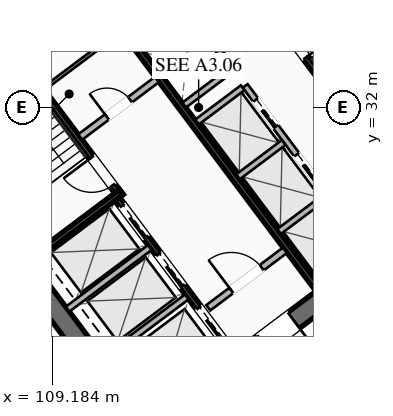
"""IFC4 building model, lengths in metres.
Left out: names, types, materials, properties, quantities, classifications, styles, units other than length and angle.
Written with IfcOpenShell. Run it as: python <this file> out.ifc"""

import sys

from ifc_helpers import new_model, si_unit, direction, frame, frame_2d, origin, place, context, subcontext, project, spatial, rectangle, extrude, element, fill, save


model = new_model("IFC4")
c1 = context("Model", 3, precision=1e-05, world=origin(), true_north=direction((0.0, 1.0)))
c2 = subcontext(c1, "Body", "Model", "MODEL_VIEW")
j1 = project(units=[si_unit("LENGTHUNIT", "METRE"), si_unit("PLANEANGLEUNIT", "RADIAN")], contexts=[c1])
p1 = place(None, origin())
s1 = spatial("IfcSite", under=j1, at=p1, CompositionType="ELEMENT")
p2 = place(p1, origin())
s2 = spatial("IfcBuilding", under=s1, at=p2, CompositionType="ELEMENT")
p3 = place(p2, frame((0.0, 0.0, 28.15)))
s3 = spatial("IfcBuildingStorey", under=s2, at=p3, CompositionType="ELEMENT", Elevation=28.15)
for number, where, z_axis, x_axis in (
    (1, (112.476, 21.107, 0.0), (0.0, 0.0, 1.0), (-0.6, 0.8, 0.0)),
    (2, (115.524, 42.893, 0.0), (0.0, 0.0, 1.0), (0.6, -0.8, 0.0)),
):
    element("IfcWall", number, at=place(p3, frame(where, z_axis=z_axis, x_axis=x_axis)), inside=s3, PredefinedType="SHEAR", context=c2, shape_type="SweptSolid", body=[
        extrude(rectangle(XDim=15.6, YDim=0.65, at=frame_2d((7.8, 0.0))), origin(), (0.0, 0.0, 1.0), 3.55),
    ])
p4 = place(p3, frame((124.429, 30.478, 0.0), z_axis=(0.0, 0.0, 1.0), x_axis=(-0.799998028465, -0.600002628705, 0.0)))
e3 = element("IfcWall", 3, at=p4, inside=s3, PredefinedType="SHEAR", context=c2, shape_type="SweptSolid", body=[
    extrude(rectangle(XDim=14.86, YDim=0.65, at=frame_2d((7.43, 0.0))), origin(), (0.0, 0.0, 1.0), 3.55),
])
p5 = place(p4, frame((9.13, 0.0, 0.0)))
e4 = element("IfcOpeningElement", 4, at=p5, cuts=e3, PredefinedType="OPENING", context=c2, shape_type="SweptSolid", body=[
    extrude(rectangle(XDim=1.25, YDim=2.25, at=frame_2d((0.625, 1.125))), frame((0.0, 0.335, 0.0), z_axis=(0.0, -1.0, 0.0), x_axis=(1.0, 0.0, 0.0)), (0.0, 0.0, 1.0), 0.67),
])
p6 = place(p4, frame((4.08, 0.0, 0.0)))
e5 = element("IfcOpeningElement", 5, at=p6, cuts=e3, PredefinedType="OPENING", context=c2, shape_type="SweptSolid", body=[
    extrude(rectangle(XDim=1.25, YDim=2.25, at=frame_2d((0.625, 1.125))), frame((0.0, 0.335, 0.0), z_axis=(0.0, -1.0, 0.0), x_axis=(1.0, 0.0, 0.0)), (0.0, 0.0, 1.0), 0.67),
])
p7 = place(p3, frame((103.571, 33.522, 0.0), z_axis=(0.0, 0.0, 1.0), x_axis=(0.799998028465, 0.600002628705, 0.0)))
e6 = element("IfcWall", 6, at=p7, inside=s3, PredefinedType="SHEAR", context=c2, shape_type="SweptSolid", body=[
    extrude(rectangle(XDim=14.86, YDim=0.65, at=frame_2d((7.43, 0.0))), origin(), (0.0, 0.0, 1.0), 3.55),
])
p8 = place(p7, frame((4.48, 0.0, 0.0)))
e7 = element("IfcOpeningElement", 7, at=p8, cuts=e6, PredefinedType="OPENING", context=c2, shape_type="SweptSolid", body=[
    extrude(rectangle(XDim=1.25, YDim=2.25, at=frame_2d((0.625, 1.125))), frame((0.0, 0.335, 0.0), z_axis=(0.0, -1.0, 0.0), x_axis=(1.0, 0.0, 0.0)), (0.0, 0.0, 1.0), 0.67),
])
p9 = place(p7, frame((9.53, 0.0, 0.0)))
e8 = element("IfcOpeningElement", 8, at=p9, cuts=e6, PredefinedType="OPENING", context=c2, shape_type="SweptSolid", body=[
    extrude(rectangle(XDim=1.25, YDim=2.25, at=frame_2d((0.625, 1.125))), frame((0.0, 0.335, 0.0), z_axis=(0.0, -1.0, 0.0), x_axis=(1.0, 0.0, 0.0)), (0.0, 0.0, 1.0), 0.67),
])
p10 = place(p3, frame((111.44, 29.08, 0.0), z_axis=(0.0, 0.0, 1.0), x_axis=(-0.600009827119, 0.799992629566, 0.0)))
e9 = element("IfcWall", 9, at=p10, inside=s3, PredefinedType="SHEAR", context=c2, shape_type="SweptSolid", body=[
    extrude(rectangle(XDim=7.95, YDim=0.2, at=frame_2d((3.975, 0.0))), origin(), (0.0, 0.0, 1.0), 3.35),
])
p11 = place(p10, frame((0.45, 0.0, 0.0)))
e10 = element("IfcOpeningElement", 10, at=p11, cuts=e9, PredefinedType="OPENING", context=c2, shape_type="SweptSolid", body=[
    extrude(rectangle(XDim=1.15, YDim=2.2, at=frame_2d((0.575, 1.1))), frame((0.0, 0.11, 0.0), z_axis=(0.0, -1.0, 0.0), x_axis=(1.0, 0.0, 0.0)), (0.0, 0.0, 1.0), 0.22),
])
p12 = place(p3, frame((108.476, 26.982, 0.0), z_axis=(0.0, 0.0, 1.0), x_axis=(0.799984290658, 0.600020945218, 0.0)))
e11 = element("IfcWall", 11, at=p12, inside=s3, PredefinedType="SHEAR", context=c2, shape_type="SweptSolid", body=[
    extrude(rectangle(XDim=3.73, YDim=0.2, at=frame_2d((1.865, 0.0))), origin(), (0.0, 0.0, 1.0), 3.35),
])
p13 = place(p3, frame((116.56, 34.92, 0.0), z_axis=(0.0, 0.0, 1.0), x_axis=(0.600009827119, -0.799992629566, 0.0)))
e12 = element("IfcWall", 12, at=p13, inside=s3, PredefinedType="SHEAR", context=c2, shape_type="SweptSolid", body=[
    extrude(rectangle(XDim=7.95, YDim=0.2, at=frame_2d((3.975, 0.0))), origin(), (0.0, 0.0, 1.0), 3.35),
])
p14 = place(p13, frame((0.45, 0.0, 0.0)))
e13 = element("IfcOpeningElement", 13, at=p14, cuts=e12, PredefinedType="OPENING", context=c2, shape_type="SweptSolid", body=[
    extrude(rectangle(XDim=1.15, YDim=2.2, at=frame_2d((0.575, 1.1))), frame((0.0, 0.11, 0.0), z_axis=(0.0, -1.0, 0.0), x_axis=(1.0, 0.0, 0.0)), (0.0, 0.0, 1.0), 0.22),
])
p15 = place(p3, frame((117.938, 26.016, 0.0), z_axis=(0.0, 0.0, 1.0), x_axis=(-0.600005463273, 0.799995902516, 0.0)))
e14 = element("IfcWall", 14, at=p15, inside=s3, PredefinedType="SHEAR", context=c2, shape_type="SweptSolid", body=[
    extrude(rectangle(XDim=14.3, YDim=0.2, at=frame_2d((7.15, 0.0))), origin(), (0.0, 0.0, 1.0), 3.35),
])
p16 = place(p3, frame((110.104, 31.028, 0.0), z_axis=(0.0, 0.0, 1.0), x_axis=(0.800018601094, 0.59997519774, 0.0)))
e15 = element("IfcWall", 15, at=p16, inside=s3, PredefinedType="SOLIDWALL", context=c2, shape_type="SweptSolid", body=[
    extrude(rectangle(XDim=3.15, YDim=0.22, at=frame_2d((1.575, 0.0))), origin(), (0.0, 0.0, 1.0), 2.703),
])
p17 = place(p16, frame((1.1, 0.0, 0.0)))
e16 = element("IfcOpeningElement", 16, at=p17, cuts=e15, PredefinedType="OPENING", context=c2, shape_type="SweptSolid", body=[
    extrude(rectangle(XDim=0.95, YDim=2.05, at=frame_2d((0.475, 1.025))), frame((0.0, 0.12, 0.0), z_axis=(0.0, -1.0, 0.0), x_axis=(1.0, 0.0, 0.0)), (0.0, 0.0, 1.0), 0.24),
])
p18 = place(p3, frame((114.316, 25.412, 0.0), z_axis=(0.0, 0.0, 1.0), x_axis=(0.800018601094, 0.59997519774, 0.0)))
e17 = element("IfcWall", 17, at=p18, inside=s3, PredefinedType="SOLIDWALL", context=c2, shape_type="SweptSolid", body=[
    extrude(rectangle(XDim=3.15, YDim=0.22, at=frame_2d((1.575, 0.0))), origin(), (0.0, 0.0, 1.0), 2.703),
])
p19 = place(p18, frame((0.95, 0.0, 0.0)))
e18 = element("IfcOpeningElement", 18, at=p19, cuts=e17, PredefinedType="OPENING", context=c2, shape_type="SweptSolid", body=[
    extrude(rectangle(XDim=1.25, YDim=2.25, at=frame_2d((0.625, 1.125))), frame((0.0, 0.12, 0.0), z_axis=(0.0, -1.0, 0.0), x_axis=(1.0, 0.0, 0.0)), (0.0, 0.0, 1.0), 0.24),
])
p20 = place(p3, frame((115.13, 23.91, 0.0), z_axis=(0.0, 0.0, 1.0), x_axis=(-0.599975393228, 0.800018454488, 0.0)))
e19 = element("IfcWall", 19, at=p20, inside=s3, PredefinedType="SHEAR", context=c2, shape_type="SweptSolid", body=[
    extrude(rectangle(XDim=6.35, YDim=0.2, at=frame_2d((3.175, 0.0))), origin(), (0.0, 0.0, 1.0), 3.35),
])
p21 = place(p20, frame((4.775, 0.0, 0.0)))
e20 = element("IfcOpeningElement", 20, at=p21, cuts=e19, PredefinedType="OPENING", context=c2, shape_type="SweptSolid", body=[
    extrude(rectangle(XDim=1.3, YDim=2.25, at=frame_2d((0.65, 1.125))), frame((0.0, 0.11, 0.0), z_axis=(0.0, -1.0, 0.0), x_axis=(1.0, 0.0, 0.0)), (0.0, 0.0, 1.0), 0.22),
])
p22 = place(p20, frame((2.775, 0.0, 0.0)))
e21 = element("IfcOpeningElement", 21, at=p22, cuts=e19, PredefinedType="OPENING", context=c2, shape_type="SweptSolid", body=[
    extrude(rectangle(XDim=1.3, YDim=2.25, at=frame_2d((0.65, 1.125))), frame((0.0, 0.11, 0.0), z_axis=(0.0, -1.0, 0.0), x_axis=(1.0, 0.0, 0.0)), (0.0, 0.0, 1.0), 0.22),
])
p23 = place(p20, frame((0.575, 0.0, 0.0)))
e22 = element("IfcOpeningElement", 22, at=p23, cuts=e19, PredefinedType="OPENING", context=c2, shape_type="SweptSolid", body=[
    extrude(rectangle(XDim=1.3, YDim=2.25, at=frame_2d((0.65, 1.125))), frame((0.0, 0.11, 0.0), z_axis=(0.0, -1.0, 0.0), x_axis=(1.0, 0.0, 0.0)), (0.0, 0.0, 1.0), 0.22),
])
for number, where, z_axis, x_axis in (
    (23, (110.906, 23.742, 0.0), (0.0, 0.0, 1.0), (0.8, 0.6, 0.0)),
    (24, (109.688, 25.366, 0.0), (0.0, 0.0, 1.0), (0.8, 0.6, 0.0)),
):
    element("IfcWall", number, at=place(p3, frame(where, z_axis=z_axis, x_axis=x_axis)), inside=s3, PredefinedType="SOLIDWALL", context=c2, shape_type="SweptSolid", body=[
        extrude(rectangle(XDim=3.38, YDim=0.2, at=frame_2d((1.69, 0.0))), origin(), (0.0, 0.0, 1.0), 3.35),
    ])
p24 = place(p3, frame((108.91, 32.62, 0.0), z_axis=(0.0, 0.0, 1.0), x_axis=(0.800018601094, 0.59997519774, 0.0)))
e25 = element("IfcWall", 25, at=p24, inside=s3, PredefinedType="PARTITIONING", context=c2, shape_type="SweptSolid", body=[
    extrude(rectangle(XDim=3.15, YDim=0.11, at=frame_2d((1.575, 0.0))), origin(), (0.0, 0.0, 1.0), 2.703),
])
p25 = place(p3, frame((119.61, 27.27, 0.0), z_axis=(0.0, 0.0, 1.0), x_axis=(-0.600011488909, 0.79999138319, 0.0)))
e26 = element("IfcWall", 26, at=p25, inside=s3, PredefinedType="SOLIDWALL", context=c2, shape_type="SweptSolid", body=[
    extrude(rectangle(XDim=6.8, YDim=0.2, at=frame_2d((3.4, 0.0))), origin(), (0.0, 0.0, 1.0), 3.35),
])
p26 = place(p25, frame((0.625, 0.0, 0.0)))
e27 = element("IfcOpeningElement", 27, at=p26, cuts=e26, PredefinedType="OPENING", context=c2, shape_type="SweptSolid", body=[
    extrude(rectangle(XDim=1.1, YDim=2.2, at=frame_2d((0.55, 1.1))), frame((0.0, 0.11, 0.0), z_axis=(0.0, -1.0, 0.0), x_axis=(1.0, 0.0, 0.0)), (0.0, 0.0, 1.0), 0.22),
])
p27 = place(p25, frame((2.875, 0.0, 0.0)))
e28 = element("IfcOpeningElement", 28, at=p27, cuts=e26, PredefinedType="OPENING", context=c2, shape_type="SweptSolid", body=[
    extrude(rectangle(XDim=1.1, YDim=2.2, at=frame_2d((0.55, 1.1))), frame((0.0, 0.11, 0.0), z_axis=(0.0, -1.0, 0.0), x_axis=(1.0, 0.0, 0.0)), (0.0, 0.0, 1.0), 0.22),
])
p28 = place(p25, frame((5.125, 0.0, 0.0)))
e29 = element("IfcOpeningElement", 29, at=p28, cuts=e26, PredefinedType="OPENING", context=c2, shape_type="SweptSolid", body=[
    extrude(rectangle(XDim=1.1, YDim=2.2, at=frame_2d((0.55, 1.1))), frame((0.0, 0.11, 0.0), z_axis=(0.0, -1.0, 0.0), x_axis=(1.0, 0.0, 0.0)), (0.0, 0.0, 1.0), 0.22),
])
p29 = place(p3, frame((116.646, 27.922, 0.0), z_axis=(0.0, 0.0, 1.0), x_axis=(0.8, 0.6, 0.0)))
e30 = element("IfcWall", 30, at=p29, inside=s3, PredefinedType="SOLIDWALL", context=c2, shape_type="SweptSolid", body=[
    extrude(rectangle(XDim=1.88, YDim=0.2, at=frame_2d((0.94, 0.0))), origin(), (0.0, 0.0, 1.0), 3.35),
])
p30 = place(p3, frame((115.296, 29.722, 0.0), z_axis=(0.0, 0.0, 1.0), x_axis=(0.799984418148, 0.600020775241, 0.0)))
e31 = element("IfcWall", 31, at=p30, inside=s3, PredefinedType="SOLIDWALL", context=c2, shape_type="SweptSolid", body=[
    extrude(rectangle(XDim=1.88, YDim=0.2, at=frame_2d((0.94, 0.0))), origin(), (0.0, 0.0, 1.0), 3.35),
])
p31 = place(p3, frame((113.946, 31.522, 0.0), z_axis=(0.0, 0.0, 1.0), x_axis=(0.8, 0.6, 0.0)))
e32 = element("IfcWall", 32, at=p31, inside=s3, PredefinedType="SOLIDWALL", context=c2, shape_type="SweptSolid", body=[
    extrude(rectangle(XDim=1.88, YDim=0.2, at=frame_2d((0.94, 0.0))), origin(), (0.0, 0.0, 1.0), 3.35),
])
p32 = place(p3, frame((115.11, 33.27, 0.0), z_axis=(0.0, 0.0, 1.0), x_axis=(-0.600011488909, 0.79999138319, 0.0)))
e33 = element("IfcWall", 33, at=p32, inside=s3, PredefinedType="SOLIDWALL", context=c2, shape_type="SweptSolid", body=[
    extrude(rectangle(XDim=6.8, YDim=0.2, at=frame_2d((3.4, 0.0))), origin(), (0.0, 0.0, 1.0), 3.35),
])
p33 = place(p3, frame((113.526, 32.082, 0.0), z_axis=(0.0, 0.0, 1.0), x_axis=(0.800046745961, 0.599937666993, 0.0)))
e34 = element("IfcWall", 34, at=p33, inside=s3, PredefinedType="SOLIDWALL", context=c2, shape_type="SweptSolid", body=[
    extrude(rectangle(XDim=1.88, YDim=0.2, at=frame_2d((0.94, 0.0))), origin(), (0.0, 0.0, 1.0), 3.35),
])
p34 = place(p3, frame((112.176, 33.882, 0.0), z_axis=(0.0, 0.0, 1.0), x_axis=(0.8, 0.6, 0.0)))
e35 = element("IfcWall", 35, at=p34, inside=s3, PredefinedType="SOLIDWALL", context=c2, shape_type="SweptSolid", body=[
    extrude(rectangle(XDim=1.88, YDim=0.2, at=frame_2d((0.94, 0.0))), origin(), (0.0, 0.0, 1.0), 3.35),
])
p35 = place(p3, frame((135.46, 34.47, 0.0), z_axis=(0.0, 0.0, 1.0), x_axis=(-0.800000982127, -0.599998690494, 0.0)))
e36 = element("IfcWall", 36, at=p35, inside=s3, PredefinedType="PARTITIONING", context=c2, shape_type="SweptSolid", body=[
    extrude(rectangle(XDim=29.83, YDim=0.135, at=frame_2d((14.915, 0.0))), origin(), (0.0, 0.0, 1.0), 2.703),
])
p36 = place(p35, frame((28.5, 0.0, 0.0)))
e37 = element("IfcOpeningElement", 37, at=p36, cuts=e36, PredefinedType="OPENING", context=c2, shape_type="SweptSolid", body=[
    extrude(rectangle(XDim=0.95, YDim=2.05, at=frame_2d((0.475, 1.025))), frame((0.0, 0.077, 0.0), z_axis=(0.0, -1.0, 0.0), x_axis=(1.0, 0.0, 0.0)), (0.0, 0.0, 1.0), 0.155),
])
p37 = place(p35, frame((18.075, 0.0, 0.0)))
e38 = element("IfcOpeningElement", 38, at=p37, cuts=e36, PredefinedType="OPENING", context=c2, shape_type="SweptSolid", body=[
    extrude(rectangle(XDim=0.95, YDim=2.05, at=frame_2d((0.475, 1.025))), frame((0.0, 0.077, 0.0), z_axis=(0.0, -1.0, 0.0), x_axis=(1.0, 0.0, 0.0)), (0.0, 0.0, 1.0), 0.155),
])
p38 = place(p35, frame((0.38, 0.0, 0.0)))
e39 = element("IfcOpeningElement", 39, at=p38, cuts=e36, PredefinedType="OPENING", context=c2, shape_type="SweptSolid", body=[
    extrude(rectangle(XDim=0.95, YDim=2.05, at=frame_2d((0.475, 1.025))), frame((0.0, 0.077, 0.0), z_axis=(0.0, -1.0, 0.0), x_axis=(1.0, 0.0, 0.0)), (0.0, 0.0, 1.0), 0.155),
])
p39 = place(p3, frame((111.548, 16.636, 0.0), z_axis=(0.0, 0.0, 1.0), x_axis=(-0.600003610192, 0.799997292343, 0.0)))
e40 = element("IfcWall", 40, at=p39, inside=s3, PredefinedType="PARTITIONING", context=c2, shape_type="SweptSolid", body=[
    extrude(rectangle(XDim=21.64, YDim=0.135, at=frame_2d((10.82, 0.0))), origin(), (0.0, 0.0, 1.0), 2.703),
])
p40 = place(p39, frame((0.3, 0.0, 0.0)))
e41 = element("IfcOpeningElement", 41, at=p40, cuts=e40, PredefinedType="OPENING", context=c2, shape_type="SweptSolid", body=[
    extrude(rectangle(XDim=0.95, YDim=2.05, at=frame_2d((0.475, 1.025))), frame((0.0, 0.077, 0.0), z_axis=(0.0, -1.0, 0.0), x_axis=(1.0, 0.0, 0.0)), (0.0, 0.0, 1.0), 0.155),
])
p41 = place(p5, origin())
e42 = element("IfcDoor", 42, at=p41, inside=s3, OperationType="SINGLE_SWING_LEFT", PredefinedType="DOOR", context=c2, shape_type="SweptSolid", body=[
    extrude(rectangle(XDim=1.25, YDim=2.25, at=frame_2d((0.625, 1.125))), frame((0.0, 0.025, 0.0), z_axis=(0.0, -1.0, 0.0), x_axis=(1.0, 0.0, 0.0)), (0.0, 0.0, 1.0), 0.05),
])
fill(e4, e42)
p42 = place(p11, origin())
e43 = element("IfcDoor", 43, at=p42, inside=s3, OperationType="SINGLE_SWING_RIGHT", PredefinedType="DOOR", context=c2, shape_type="SweptSolid", body=[
    extrude(rectangle(XDim=1.15, YDim=2.2, at=frame_2d((0.575, 1.1))), frame((0.0, 0.025, 0.0), z_axis=(0.0, -1.0, 0.0), x_axis=(1.0, 0.0, 0.0)), (0.0, 0.0, 1.0), 0.05),
])
fill(e10, e43)
p43 = place(p14, origin())
e44 = element("IfcDoor", 44, at=p43, inside=s3, OperationType="SINGLE_SWING_RIGHT", PredefinedType="DOOR", context=c2, shape_type="SweptSolid", body=[
    extrude(rectangle(XDim=1.15, YDim=2.2, at=frame_2d((0.575, 1.1))), frame((0.0, 0.025, 0.0), z_axis=(0.0, -1.0, 0.0), x_axis=(1.0, 0.0, 0.0)), (0.0, 0.0, 1.0), 0.05),
])
fill(e13, e44)
p44 = place(p19, origin())
e45 = element("IfcDoor", 45, at=p44, inside=s3, OperationType="SINGLE_SWING_LEFT", PredefinedType="DOOR", context=c2, shape_type="SweptSolid", body=[
    extrude(rectangle(XDim=1.25, YDim=2.25, at=frame_2d((0.625, 1.125))), frame((0.0, 0.025, 0.0), z_axis=(0.0, -1.0, 0.0), x_axis=(1.0, 0.0, 0.0)), (0.0, 0.0, 1.0), 0.05),
])
fill(e18, e45)
p45 = place(p17, origin())
e46 = element("IfcDoor", 46, at=p45, inside=s3, OperationType="SINGLE_SWING_LEFT", PredefinedType="DOOR", context=c2, shape_type="SweptSolid", body=[
    extrude(rectangle(XDim=0.95, YDim=2.05, at=frame_2d((0.475, 1.025))), frame((0.0, 0.025, 0.0), z_axis=(0.0, -1.0, 0.0), x_axis=(1.0, 0.0, 0.0)), (0.0, 0.0, 1.0), 0.05),
])
fill(e16, e46)
p46 = place(p21, origin())
e47 = element("IfcDoor", 47, at=p46, inside=s3, OperationType="SLIDING_TO_LEFT", PredefinedType="DOOR", context=c2, shape_type="SweptSolid", body=[
    extrude(rectangle(XDim=1.3, YDim=2.25, at=frame_2d((0.65, 1.125))), frame((0.0, 0.025, 0.0), z_axis=(0.0, -1.0, 0.0), x_axis=(1.0, 0.0, 0.0)), (0.0, 0.0, 1.0), 0.05),
])
fill(e20, e47)
p47 = place(p22, origin())
e48 = element("IfcDoor", 48, at=p47, inside=s3, OperationType="SLIDING_TO_LEFT", PredefinedType="DOOR", context=c2, shape_type="SweptSolid", body=[
    extrude(rectangle(XDim=1.3, YDim=2.25, at=frame_2d((0.65, 1.125))), frame((0.0, 0.025, 0.0), z_axis=(0.0, -1.0, 0.0), x_axis=(1.0, 0.0, 0.0)), (0.0, 0.0, 1.0), 0.05),
])
fill(e21, e48)
p48 = place(p23, origin())
e49 = element("IfcDoor", 49, at=p48, inside=s3, OperationType="SLIDING_TO_LEFT", PredefinedType="DOOR", context=c2, shape_type="SweptSolid", body=[
    extrude(rectangle(XDim=1.3, YDim=2.25, at=frame_2d((0.65, 1.125))), frame((0.0, 0.025, 0.0), z_axis=(0.0, -1.0, 0.0), x_axis=(1.0, 0.0, 0.0)), (0.0, 0.0, 1.0), 0.05),
])
fill(e22, e49)
p49 = place(p27, origin())
e50 = element("IfcDoor", 50, at=p49, inside=s3, OperationType="SLIDING_TO_LEFT", PredefinedType="DOOR", context=c2, shape_type="SweptSolid", body=[
    extrude(rectangle(XDim=1.1, YDim=2.2, at=frame_2d((0.55, 1.1))), frame((0.0, 0.025, 0.0), z_axis=(0.0, -1.0, 0.0), x_axis=(1.0, 0.0, 0.0)), (0.0, 0.0, 1.0), 0.05),
])
fill(e28, e50)
p50 = place(p28, origin())
e51 = element("IfcDoor", 51, at=p50, inside=s3, OperationType="SLIDING_TO_LEFT", PredefinedType="DOOR", context=c2, shape_type="SweptSolid", body=[
    extrude(rectangle(XDim=1.1, YDim=2.2, at=frame_2d((0.55, 1.1))), frame((0.0, 0.025, 0.0), z_axis=(0.0, -1.0, 0.0), x_axis=(1.0, 0.0, 0.0)), (0.0, 0.0, 1.0), 0.05),
])
fill(e29, e51)
save(model, sys.argv[1])
